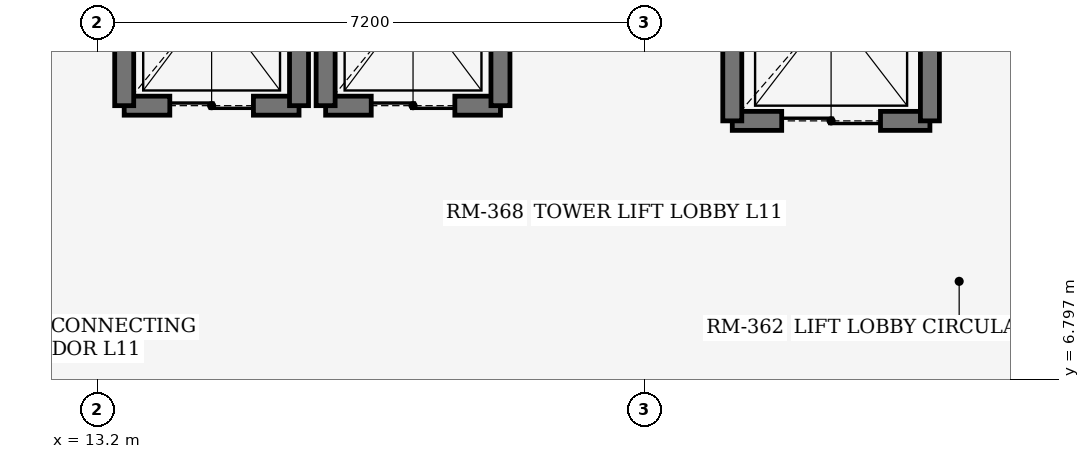
"""IFC4 building model, lengths in metres.
Left out: names, types, materials, properties, quantities, classifications, styles, units other than length and angle.
Written with IfcOpenShell. Run it as: python <this file> out.ifc"""

import sys

from ifc_helpers import new_model, si_unit, direction, frame, frame_2d, origin, place, context, subcontext, project, spatial, rectangle, extrude, element, fill, save


model = new_model("IFC4")
c1 = context("Model", 3, precision=1e-05, world=origin(), true_north=direction((0.0, 1.0)))
c2 = subcontext(c1, "Body", "Model", "MODEL_VIEW")
j1 = project(units=[si_unit("LENGTHUNIT", "METRE"), si_unit("PLANEANGLEUNIT", "RADIAN")], contexts=[c1])
p1 = place(None, origin())
s1 = spatial("IfcSite", under=j1, at=p1, CompositionType="ELEMENT")
p2 = place(p1, origin())
s2 = spatial("IfcBuilding", under=s1, at=p2, CompositionType="ELEMENT")
p3 = place(p2, frame((0.0, 0.0, 44.4)))
s3 = spatial("IfcBuildingStorey", under=s2, at=p3, CompositionType="ELEMENT", Elevation=44.4)
p4 = place(p3, frame((13.55, 10.4, 0.0), z_axis=(0.0, 0.0, 1.0), x_axis=(1.0, 0.0, 0.0)))
e1 = element("IfcWall", 1, at=p4, inside=s3, PredefinedType="SHEAR", context=c2, shape_type="SweptSolid", body=[
    extrude(rectangle(XDim=2.3, YDim=0.25, at=frame_2d((1.15, 0.0))), origin(), (0.0, 0.0, 1.0), 3.69),
])
p5 = place(p4, frame((0.6, 0.0, 0.0)))
e2 = element("IfcOpeningElement", 2, at=p5, cuts=e1, PredefinedType="OPENING", context=c2, shape_type="SweptSolid", body=[
    extrude(rectangle(XDim=1.1, YDim=2.2, at=frame_2d((0.55, 1.1))), frame((0.0, 0.135, 0.0), z_axis=(0.0, -1.0, 0.0), x_axis=(1.0, 0.0, 0.0)), (0.0, 0.0, 1.0), 0.27),
])
for number, where, z_axis, x_axis in (
    (3, (13.55, 10.4, 0.0), (0.0, 0.0, 1.0), (0.0, 1.0, 0.0)),
    (4, (15.85, 10.4, 0.0), (0.0, 0.0, 1.0), (0.0, 1.0, 0.0)),
):
    element("IfcWall", number, at=place(p3, frame(where, z_axis=z_axis, x_axis=x_axis)), inside=s3, PredefinedType="SHEAR", context=c2, shape_type="SweptSolid", body=[
        extrude(rectangle(XDim=2.8, YDim=0.25, at=frame_2d((1.4, 0.0))), origin(), (0.0, 0.0, 1.0), 3.69),
    ])
p6 = place(p3, frame((16.2, 10.4, 0.0), z_axis=(0.0, 0.0, 1.0), x_axis=(1.0, 0.0, 0.0)))
e5 = element("IfcWall", 5, at=p6, inside=s3, PredefinedType="SHEAR", context=c2, shape_type="SweptSolid", body=[
    extrude(rectangle(XDim=2.3, YDim=0.25, at=frame_2d((1.15, 0.0))), origin(), (0.0, 0.0, 1.0), 3.69),
])
p7 = place(p6, frame((0.6, 0.0, 0.0)))
e6 = element("IfcOpeningElement", 6, at=p7, cuts=e5, PredefinedType="OPENING", context=c2, shape_type="SweptSolid", body=[
    extrude(rectangle(XDim=1.1, YDim=2.2, at=frame_2d((0.55, 1.1))), frame((0.0, 0.135, 0.0), z_axis=(0.0, -1.0, 0.0), x_axis=(1.0, 0.0, 0.0)), (0.0, 0.0, 1.0), 0.27),
])
for number, where, z_axis, x_axis in (
    (7, (16.2, 10.4, 0.0), (0.0, 0.0, 1.0), (0.0, 1.0, 0.0)),
    (8, (18.5, 10.4, 0.0), (0.0, 0.0, 1.0), (0.0, 1.0, 0.0)),
):
    element("IfcWall", number, at=place(p3, frame(where, z_axis=z_axis, x_axis=x_axis)), inside=s3, PredefinedType="SHEAR", context=c2, shape_type="SweptSolid", body=[
        extrude(rectangle(XDim=2.8, YDim=0.25, at=frame_2d((1.4, 0.0))), origin(), (0.0, 0.0, 1.0), 3.69),
    ])
p8 = place(p3, frame((21.55, 10.2, 0.0), z_axis=(0.0, 0.0, 1.0), x_axis=(1.0, 0.0, 0.0)))
e9 = element("IfcWall", 9, at=p8, inside=s3, PredefinedType="SHEAR", context=c2, shape_type="SweptSolid", body=[
    extrude(rectangle(XDim=2.6, YDim=0.25, at=frame_2d((1.3, 0.0))), origin(), (0.0, 0.0, 1.0), 3.69),
])
p9 = place(p8, frame((0.65, 0.0, 0.0)))
e10 = element("IfcOpeningElement", 10, at=p9, cuts=e9, PredefinedType="OPENING", context=c2, shape_type="SweptSolid", body=[
    extrude(rectangle(XDim=1.3, YDim=2.25, at=frame_2d((0.65, 1.125))), frame((0.0, 0.135, 0.0), z_axis=(0.0, -1.0, 0.0), x_axis=(1.0, 0.0, 0.0)), (0.0, 0.0, 1.0), 0.27),
])
for number, where, z_axis, x_axis in (
    (11, (21.55, 10.2, 0.0), (0.0, 0.0, 1.0), (0.0, 1.0, 0.0)),
    (12, (24.15, 10.2, 0.0), (0.0, 0.0, 1.0), (0.0, 1.0, 0.0)),
):
    element("IfcWall", number, at=place(p3, frame(where, z_axis=z_axis, x_axis=x_axis)), inside=s3, PredefinedType="SHEAR", context=c2, shape_type="SweptSolid", body=[
        extrude(rectangle(XDim=3.0, YDim=0.25, at=frame_2d((1.5, 0.0))), origin(), (0.0, 0.0, 1.0), 3.69),
    ])
p10 = place(p5, origin())
e13 = element("IfcDoor", 13, at=p10, inside=s3, OperationType="DOUBLE_DOOR_SLIDING", PredefinedType="DOOR", context=c2, shape_type="SweptSolid", body=[
    extrude(rectangle(XDim=1.1, YDim=2.2, at=frame_2d((0.55, 1.1))), frame((0.0, 0.025, 0.0), z_axis=(0.0, -1.0, 0.0), x_axis=(1.0, 0.0, 0.0)), (0.0, 0.0, 1.0), 0.05),
])
fill(e2, e13)
p11 = place(p7, origin())
e14 = element("IfcDoor", 14, at=p11, inside=s3, OperationType="DOUBLE_DOOR_SLIDING", PredefinedType="DOOR", context=c2, shape_type="SweptSolid", body=[
    extrude(rectangle(XDim=1.1, YDim=2.2, at=frame_2d((0.55, 1.1))), frame((0.0, 0.025, 0.0), z_axis=(0.0, -1.0, 0.0), x_axis=(1.0, 0.0, 0.0)), (0.0, 0.0, 1.0), 0.05),
])
fill(e6, e14)
p12 = place(p9, origin())
e15 = element("IfcDoor", 15, at=p12, inside=s3, OperationType="DOUBLE_DOOR_SLIDING", PredefinedType="DOOR", context=c2, shape_type="SweptSolid", body=[
    extrude(rectangle(XDim=1.3, YDim=2.25, at=frame_2d((0.65, 1.125))), frame((0.0, 0.025, 0.0), z_axis=(0.0, -1.0, 0.0), x_axis=(1.0, 0.0, 0.0)), (0.0, 0.0, 1.0), 0.05),
])
fill(e10, e15)
save(model, sys.argv[1])
